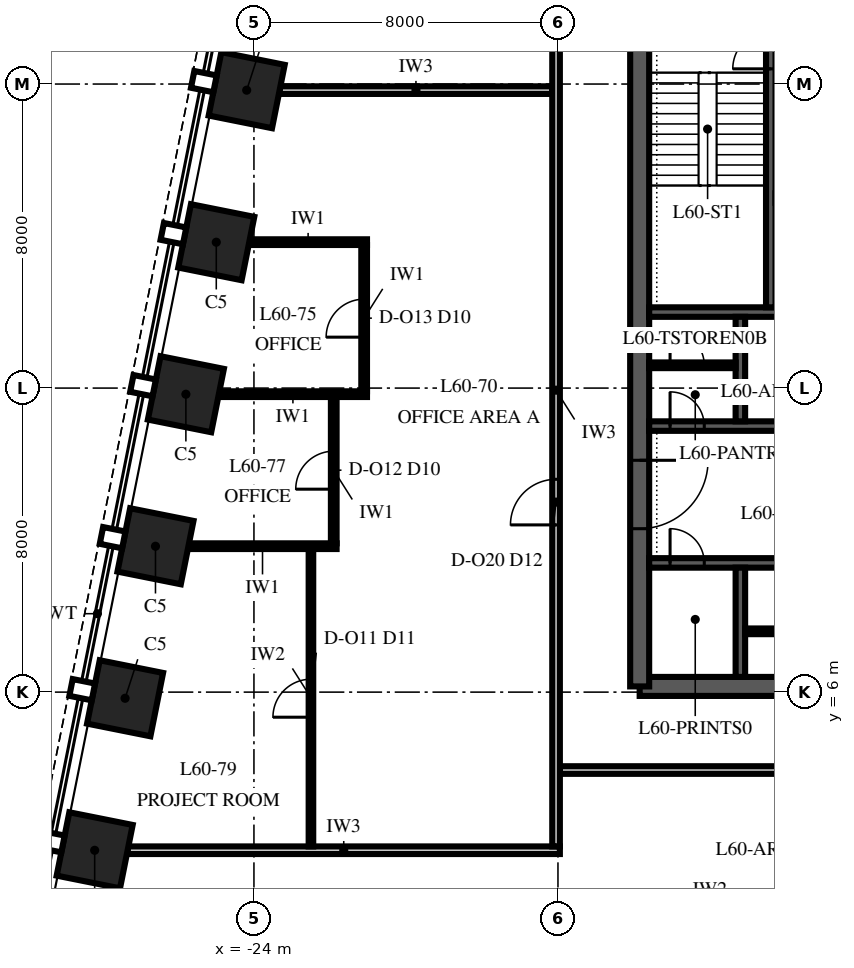
"""IFC4 building model, lengths in metres.
Left out: names, types, materials, properties, quantities, classifications, styles, units other than length and angle.
Written with IfcOpenShell. Run it as: python <this file> out.ifc"""

import sys

from ifc_helpers import new_model, si_unit, direction, frame, frame_2d, origin, origin_2d, place, context, subcontext, project, spatial, polyline, rectangle, outline, extrude, element, fill, save


model = new_model("IFC4")
c1 = context("Model", 3, precision=1e-05, world=origin(), true_north=direction((0.0, 1.0)))
c2 = subcontext(c1, "Body", "Model", "MODEL_VIEW")
j1 = project(units=[si_unit("LENGTHUNIT", "METRE"), si_unit("PLANEANGLEUNIT", "RADIAN")], contexts=[c1])
p1 = place(None, origin())
s1 = spatial("IfcSite", under=j1, at=p1, CompositionType="ELEMENT")
p2 = place(p1, origin())
s2 = spatial("IfcBuilding", under=s1, at=p2, CompositionType="ELEMENT")
p3 = place(p2, frame((0.0, 0.0, 260.0)))
s3 = spatial("IfcBuildingStorey", under=s2, at=p3, CompositionType="ELEMENT", Elevation=260.0)
for number, where, z_axis, x_axis in (
    (1, (-24.191, 21.838, 0.0), (0.0, 0.0, 1.0), (-0.196, -0.981, 0.0)),
    (2, (-24.991, 17.838, 0.0), (0.0, 0.0, 1.0), (-0.196, -0.981, 0.0)),
    (3, (-25.791, 13.838, 0.0), (0.0, 0.0, 1.0), (-0.196, -0.981, 0.0)),
    (4, (-26.591, 9.838, 0.0), (0.0, 0.0, 1.0), (-0.196, -0.981, 0.0)),
    (5, (-27.391, 5.838, 0.0), (0.0, 0.0, 1.0), (-0.196, -0.981, 0.0)),
    (6, (-28.191, 1.838, 0.0), (0.0, 0.0, 1.0), (-0.196, -0.981, 0.0)),
):
    element("IfcColumn", number, at=place(p3, frame(where, z_axis=z_axis, x_axis=x_axis)), inside=s3, PredefinedType="COLUMN", context=c2, shape_type="SweptSolid", body=[
        extrude(rectangle(XDim=1.7, YDim=1.7, at=origin_2d()), origin(), (0.0, 0.0, 1.0), 4.0),
    ])
p4 = place(p3, frame((-13.85, 6.15, 0.0), z_axis=(0.0, 0.0, 1.0), x_axis=(1.0, 0.0, 0.0)))
e7 = element("IfcWall", 7, at=p4, inside=s3, PredefinedType="SHEAR", context=c2, shape_type="SweptSolid", body=[
    extrude(rectangle(XDim=27.7, YDim=0.5, at=frame_2d((13.85, 0.0))), origin(), (0.0, 0.0, 1.0), 4.0),
])
p5 = place(p3, frame((-13.85, 23.85, 0.0), z_axis=(0.0, 0.0, 1.0), x_axis=(0.0, -1.0, 0.0)))
e8 = element("IfcWall", 8, at=p5, inside=s3, PredefinedType="SHEAR", context=c2, shape_type="SweptSolid", body=[
    extrude(outline(polyline([(0.0, -0.25), (17.7, -0.25), (17.7, 0.0), (17.45, 0.0), (17.45, 0.25), (0.25, 0.25), (0.25, 0.0), (0.0, 0.0), (0.0, -0.25)])), origin(), (0.0, 0.0, 1.0), 4.0),
])
p6 = place(p5, frame((11.75, 0.0, 0.0)))
e9 = element("IfcOpeningElement", 9, at=p6, cuts=e8, PredefinedType="OPENING", context=c2, shape_type="SweptSolid", body=[
    extrude(rectangle(XDim=1.8, YDim=2.4, at=frame_2d((0.9, 1.2))), frame((0.0, 0.265, 0.0), z_axis=(0.0, -1.0, 0.0), x_axis=(1.0, 0.0, 0.0)), (0.0, 0.0, 1.0), 0.53),
])
p7 = place(p3, frame((-13.6, 9.4, 0.0), z_axis=(0.0, 0.0, 1.0), x_axis=(1.0, 0.0, 0.0)))
e10 = element("IfcWall", 10, at=p7, inside=s3, PredefinedType="SHEAR", context=c2, shape_type="SweptSolid", body=[
    extrude(rectangle(XDim=27.2, YDim=0.25, at=frame_2d((13.6, 0.0))), origin(), (0.0, 0.0, 1.0), 4.0),
])
p8 = place(p7, frame((8.85, 0.0, 0.0)))
e11 = element("IfcOpeningElement", 11, at=p8, cuts=e10, PredefinedType="OPENING", context=c2, shape_type="SweptSolid", body=[
    extrude(rectangle(XDim=1.1, YDim=2.1, at=frame_2d((0.55, 1.05))), frame((0.0, 0.14, 0.0), z_axis=(0.0, -1.0, 0.0), x_axis=(1.0, 0.0, 0.0)), (0.0, 0.0, 1.0), 0.28),
])
p9 = place(p7, frame((11.65, 0.0, 0.0)))
e12 = element("IfcOpeningElement", 12, at=p9, cuts=e10, PredefinedType="OPENING", context=c2, shape_type="SweptSolid", body=[
    extrude(rectangle(XDim=1.1, YDim=2.1, at=frame_2d((0.55, 1.05))), frame((0.0, 0.14, 0.0), z_axis=(0.0, -1.0, 0.0), x_axis=(1.0, 0.0, 0.0)), (0.0, 0.0, 1.0), 0.28),
])
p10 = place(p7, frame((14.45, 0.0, 0.0)))
e13 = element("IfcOpeningElement", 13, at=p10, cuts=e10, PredefinedType="OPENING", context=c2, shape_type="SweptSolid", body=[
    extrude(rectangle(XDim=1.1, YDim=2.1, at=frame_2d((0.55, 1.05))), frame((0.0, 0.14, 0.0), z_axis=(0.0, -1.0, 0.0), x_axis=(1.0, 0.0, 0.0)), (0.0, 0.0, 1.0), 0.28),
])
p11 = place(p7, frame((0.55, 0.0, 0.0)))
e14 = element("IfcOpeningElement", 14, at=p11, cuts=e10, PredefinedType="OPENING", context=c2, shape_type="SweptSolid", body=[
    extrude(rectangle(XDim=0.9, YDim=2.1, at=frame_2d((0.45, 1.05))), frame((0.0, 0.14, 0.0), z_axis=(0.0, -1.0, 0.0), x_axis=(1.0, 0.0, 0.0)), (0.0, 0.0, 1.0), 0.28),
])
p12 = place(p7, frame((3.35, 0.0, 0.0)))
e15 = element("IfcOpeningElement", 15, at=p12, cuts=e10, PredefinedType="OPENING", context=c2, shape_type="SweptSolid", body=[
    extrude(rectangle(XDim=0.9, YDim=2.1, at=frame_2d((0.45, 1.05))), frame((0.0, 0.14, 0.0), z_axis=(0.0, -1.0, 0.0), x_axis=(1.0, 0.0, 0.0)), (0.0, 0.0, 1.0), 0.28),
])
p13 = place(p7, frame((6.15, 0.0, 0.0)))
e16 = element("IfcOpeningElement", 16, at=p13, cuts=e10, PredefinedType="OPENING", context=c2, shape_type="SweptSolid", body=[
    extrude(rectangle(XDim=0.9, YDim=2.1, at=frame_2d((0.45, 1.05))), frame((0.0, 0.14, 0.0), z_axis=(0.0, -1.0, 0.0), x_axis=(1.0, 0.0, 0.0)), (0.0, 0.0, 1.0), 0.28),
])
p14 = place(p7, frame((17.35, 0.0, 0.0)))
e17 = element("IfcOpeningElement", 17, at=p14, cuts=e10, PredefinedType="OPENING", context=c2, shape_type="SweptSolid", body=[
    extrude(rectangle(XDim=0.9, YDim=2.1, at=frame_2d((0.45, 1.05))), frame((0.0, 0.14, 0.0), z_axis=(0.0, -1.0, 0.0), x_axis=(1.0, 0.0, 0.0)), (0.0, 0.0, 1.0), 0.28),
])
p15 = place(p7, frame((20.15, 0.0, 0.0)))
e18 = element("IfcOpeningElement", 18, at=p15, cuts=e10, PredefinedType="OPENING", context=c2, shape_type="SweptSolid", body=[
    extrude(rectangle(XDim=0.9, YDim=2.1, at=frame_2d((0.45, 1.05))), frame((0.0, 0.14, 0.0), z_axis=(0.0, -1.0, 0.0), x_axis=(1.0, 0.0, 0.0)), (0.0, 0.0, 1.0), 0.28),
])
p16 = place(p7, frame((22.95, 0.0, 0.0)))
e19 = element("IfcOpeningElement", 19, at=p16, cuts=e10, PredefinedType="OPENING", context=c2, shape_type="SweptSolid", body=[
    extrude(rectangle(XDim=0.9, YDim=2.1, at=frame_2d((0.45, 1.05))), frame((0.0, 0.14, 0.0), z_axis=(0.0, -1.0, 0.0), x_axis=(1.0, 0.0, 0.0)), (0.0, 0.0, 1.0), 0.28),
])
p17 = place(p3, frame((-13.6, 13.0, 0.0), z_axis=(0.0, 0.0, 1.0), x_axis=(1.0, 0.0, 0.0)))
e20 = element("IfcWall", 20, at=p17, inside=s3, PredefinedType="SHEAR", context=c2, shape_type="SweptSolid", body=[
    extrude(rectangle(XDim=27.2, YDim=0.25, at=frame_2d((13.6, 0.0))), origin(), (0.0, 0.0, 1.0), 4.0),
])
p18 = place(p17, frame((15.25, 0.0, 0.0)))
e21 = element("IfcOpeningElement", 21, at=p18, cuts=e20, PredefinedType="OPENING", context=c2, shape_type="SweptSolid", body=[
    extrude(rectangle(XDim=0.9, YDim=2.1, at=frame_2d((0.45, 1.05))), frame((0.0, 0.14, 0.0), z_axis=(0.0, -1.0, 0.0), x_axis=(1.0, 0.0, 0.0)), (0.0, 0.0, 1.0), 0.28),
])
p19 = place(p17, frame((17.65, 0.0, 0.0)))
e22 = element("IfcOpeningElement", 22, at=p19, cuts=e20, PredefinedType="OPENING", context=c2, shape_type="SweptSolid", body=[
    extrude(rectangle(XDim=0.9, YDim=2.1, at=frame_2d((0.45, 1.05))), frame((0.0, 0.14, 0.0), z_axis=(0.0, -1.0, 0.0), x_axis=(1.0, 0.0, 0.0)), (0.0, 0.0, 1.0), 0.28),
])
p20 = place(p17, frame((21.15, 0.0, 0.0)))
e23 = element("IfcOpeningElement", 23, at=p20, cuts=e20, PredefinedType="OPENING", context=c2, shape_type="SweptSolid", body=[
    extrude(rectangle(XDim=0.9, YDim=2.1, at=frame_2d((0.45, 1.05))), frame((0.0, 0.14, 0.0), z_axis=(0.0, -1.0, 0.0), x_axis=(1.0, 0.0, 0.0)), (0.0, 0.0, 1.0), 0.28),
])
p21 = place(p17, frame((0.55, 0.0, 0.0)))
e24 = element("IfcOpeningElement", 24, at=p21, cuts=e20, PredefinedType="OPENING", context=c2, shape_type="SweptSolid", body=[
    extrude(rectangle(XDim=0.9, YDim=2.1, at=frame_2d((0.45, 1.05))), frame((0.0, 0.14, 0.0), z_axis=(0.0, -1.0, 0.0), x_axis=(1.0, 0.0, 0.0)), (0.0, 0.0, 1.0), 0.28),
])
p22 = place(p17, frame((3.35, 0.0, 0.0)))
e25 = element("IfcOpeningElement", 25, at=p22, cuts=e20, PredefinedType="OPENING", context=c2, shape_type="SweptSolid", body=[
    extrude(rectangle(XDim=0.9, YDim=2.1, at=frame_2d((0.45, 1.05))), frame((0.0, 0.14, 0.0), z_axis=(0.0, -1.0, 0.0), x_axis=(1.0, 0.0, 0.0)), (0.0, 0.0, 1.0), 0.28),
])
p23 = place(p17, frame((6.15, 0.0, 0.0)))
e26 = element("IfcOpeningElement", 26, at=p23, cuts=e20, PredefinedType="OPENING", context=c2, shape_type="SweptSolid", body=[
    extrude(rectangle(XDim=0.9, YDim=2.1, at=frame_2d((0.45, 1.05))), frame((0.0, 0.14, 0.0), z_axis=(0.0, -1.0, 0.0), x_axis=(1.0, 0.0, 0.0)), (0.0, 0.0, 1.0), 0.28),
])
p24 = place(p3, frame((-13.6, 16.0, 0.0), z_axis=(0.0, 0.0, 1.0), x_axis=(1.0, 0.0, 0.0)))
e27 = element("IfcWall", 27, at=p24, inside=s3, PredefinedType="SHEAR", context=c2, shape_type="SweptSolid", body=[
    extrude(rectangle(XDim=27.2, YDim=0.25, at=frame_2d((13.6, 0.0))), origin(), (0.0, 0.0, 1.0), 4.0),
])
p25 = place(p3, frame((-11.2, 6.4, 0.0), z_axis=(0.0, 0.0, 1.0), x_axis=(0.0, 1.0, 0.0)))
e28 = element("IfcWall", 28, at=p25, inside=s3, PredefinedType="SHEAR", context=c2, shape_type="SweptSolid", body=[
    extrude(rectangle(XDim=2.875, YDim=0.25, at=frame_2d((1.438, 0.0))), origin(), (0.0, 0.0, 1.0), 4.0),
])
p26 = place(p3, frame((-11.2, 13.125, 0.0), z_axis=(0.0, 0.0, 1.0), x_axis=(0.0, 1.0, 0.0)))
e29 = element("IfcWall", 29, at=p26, inside=s3, PredefinedType="SHEAR", context=c2, shape_type="SweptSolid", body=[
    extrude(rectangle(XDim=2.75, YDim=0.25, at=frame_2d((1.375, 0.0))), origin(), (0.0, 0.0, 1.0), 4.0),
])
p27 = place(p3, frame((-10.4, 16.125, 0.0), z_axis=(0.0, 0.0, 1.0), x_axis=(0.0, 1.0, 0.0)))
e30 = element("IfcWall", 30, at=p27, inside=s3, PredefinedType="SHEAR", context=c2, shape_type="SweptSolid", body=[
    extrude(rectangle(XDim=7.475, YDim=0.25, at=frame_2d((3.738, 0.0))), origin(), (0.0, 0.0, 1.0), 4.0),
])
p28 = place(p27, frame((6.275, 0.0, 0.0)))
e31 = element("IfcOpeningElement", 31, at=p28, cuts=e30, PredefinedType="OPENING", context=c2, shape_type="SweptSolid", body=[
    extrude(rectangle(XDim=1.0, YDim=2.1, at=frame_2d((0.5, 1.05))), frame((0.0, 0.14, 0.0), z_axis=(0.0, -1.0, 0.0), x_axis=(1.0, 0.0, 0.0)), (0.0, 0.0, 1.0), 0.28),
])
p29 = place(p3, frame((-13.6, 14.6, 0.0), z_axis=(0.0, 0.0, 1.0), x_axis=(1.0, 0.0, 0.0)))
e32 = element("IfcWall", 32, at=p29, inside=s3, PredefinedType="PARTITIONING", context=c2, shape_type="SweptSolid", body=[
    extrude(rectangle(XDim=2.275, YDim=0.15, at=frame_2d((1.138, 0.0))), origin(), (0.0, 0.0, 1.0), 3.85),
])
p30 = place(p29, frame((0.55, 0.0, 0.0)))
e33 = element("IfcOpeningElement", 33, at=p30, cuts=e32, PredefinedType="OPENING", context=c2, shape_type="SweptSolid", body=[
    extrude(rectangle(XDim=0.9, YDim=2.1, at=frame_2d((0.45, 1.05))), frame((0.0, 0.09, 0.0), z_axis=(0.0, -1.0, 0.0), x_axis=(1.0, 0.0, 0.0)), (0.0, 0.0, 1.0), 0.18),
])
p31 = place(p3, frame((-11.075, 7.6, 0.0), z_axis=(0.0, 0.0, 1.0), x_axis=(1.0, 0.0, 0.0)))
e34 = element("IfcWall", 34, at=p31, inside=s3, PredefinedType="PARTITIONING", context=c2, shape_type="SweptSolid", body=[
    extrude(rectangle(XDim=2.55, YDim=0.15, at=frame_2d((1.275, 0.0))), origin(), (0.0, 0.0, 1.0), 3.85),
])
p32 = place(p31, frame((0.825, 0.0, 0.0)))
e35 = element("IfcOpeningElement", 35, at=p32, cuts=e34, PredefinedType="OPENING", context=c2, shape_type="SweptSolid", body=[
    extrude(rectangle(XDim=0.9, YDim=2.1, at=frame_2d((0.45, 1.05))), frame((0.0, 0.09, 0.0), z_axis=(0.0, -1.0, 0.0), x_axis=(1.0, 0.0, 0.0)), (0.0, 0.0, 1.0), 0.18),
])
p33 = place(p3, frame((-27.324, 1.84, 0.0), z_axis=(0.0, 0.0, 1.0), x_axis=(1.0, 0.0, 0.0)))
e36 = element("IfcWall", 36, at=p33, inside=s3, PredefinedType="PARTITIONING", context=c2, shape_type="SweptSolid", body=[
    extrude(rectangle(XDim=11.374, YDim=0.2, at=frame_2d((5.687, 0.0))), origin(), (0.0, 0.0, 1.0), 3.23),
])
p34 = place(p3, frame((-15.95, 3.95, 0.0), z_axis=(0.0, 0.0, 1.0), x_axis=(1.0, 0.0, 0.0)))
e37 = element("IfcWall", 37, at=p34, inside=s3, PredefinedType="PARTITIONING", context=c2, shape_type="SweptSolid", body=[
    extrude(rectangle(XDim=14.05, YDim=0.2, at=frame_2d((7.025, 0.0))), origin(), (0.0, 0.0, 1.0), 3.23),
])
p35 = place(p34, frame((7.35, 0.0, 0.0)))
e38 = element("IfcOpeningElement", 38, at=p35, cuts=e37, PredefinedType="OPENING", context=c2, shape_type="SweptSolid", body=[
    extrude(rectangle(XDim=1.2, YDim=2.4, at=frame_2d((0.6, 1.2))), frame((0.0, 0.115, 0.0), z_axis=(0.0, -1.0, 0.0), x_axis=(1.0, 0.0, 0.0)), (0.0, 0.0, 1.0), 0.23),
])
for number, where, z_axis, x_axis in (
    (39, (-25.724, 9.84, 0.0), (0.0, 0.0, 1.0), (1.0, 0.0, 0.0)),
    (40, (-24.924, 13.84, 0.0), (0.0, 0.0, 1.0), (1.0, 0.0, 0.0)),
):
    element("IfcWall", number, at=place(p3, frame(where, z_axis=z_axis, x_axis=x_axis)), inside=s3, PredefinedType="PARTITIONING", context=c2, shape_type="SweptSolid", body=[
        extrude(rectangle(XDim=3.899, YDim=0.15, at=frame_2d((1.949, 0.0))), origin(), (0.0, 0.0, 1.0), 3.23),
    ])
p36 = place(p3, frame((-24.124, 17.84, 0.0), z_axis=(0.0, 0.0, 1.0), x_axis=(1.0, 0.0, 0.0)))
e41 = element("IfcWall", 41, at=p36, inside=s3, PredefinedType="PARTITIONING", context=c2, shape_type="SweptSolid", body=[
    extrude(rectangle(XDim=3.099, YDim=0.15, at=frame_2d((1.549, 0.0))), origin(), (0.0, 0.0, 1.0), 3.23),
])
p37 = place(p3, frame((-23.324, 21.84, 0.0), z_axis=(0.0, 0.0, 1.0), x_axis=(1.0, 0.0, 0.0)))
e42 = element("IfcWall", 42, at=p37, inside=s3, PredefinedType="PARTITIONING", context=c2, shape_type="SweptSolid", body=[
    extrude(rectangle(XDim=7.174, YDim=0.2, at=frame_2d((3.587, 0.0))), origin(), (0.0, 0.0, 1.0), 3.23),
])
p38 = place(p3, frame((-22.5, 1.94, 0.0), z_axis=(0.0, 0.0, 1.0), x_axis=(0.0, 1.0, 0.0)))
e43 = element("IfcWall", 43, at=p38, inside=s3, PredefinedType="PARTITIONING", context=c2, shape_type="SweptSolid", body=[
    extrude(rectangle(XDim=7.825, YDim=0.12, at=frame_2d((3.913, 0.0))), origin(), (0.0, 0.0, 1.0), 2.842),
])
p39 = place(p38, frame((3.4, 0.0, 0.0)))
e44 = element("IfcOpeningElement", 44, at=p39, cuts=e43, PredefinedType="OPENING", context=c2, shape_type="SweptSolid", body=[
    extrude(rectangle(XDim=1.0, YDim=2.4, at=frame_2d((0.5, 1.2))), frame((0.0, 0.075, 0.0), z_axis=(0.0, -1.0, 0.0), x_axis=(1.0, 0.0, 0.0)), (0.0, 0.0, 1.0), 0.15),
])
p40 = place(p3, frame((-21.9, 9.915, 0.0), z_axis=(0.0, 0.0, 1.0), x_axis=(0.0, 1.0, 0.0)))
e45 = element("IfcWall", 45, at=p40, inside=s3, PredefinedType="PARTITIONING", context=c2, shape_type="SweptSolid", body=[
    extrude(rectangle(XDim=3.85, YDim=0.15, at=frame_2d((1.925, 0.0))), origin(), (0.0, 0.0, 1.0), 3.85),
])
p41 = place(p40, frame((1.425, 0.0, 0.0)))
e46 = element("IfcOpeningElement", 46, at=p41, cuts=e45, PredefinedType="OPENING", context=c2, shape_type="SweptSolid", body=[
    extrude(rectangle(XDim=1.0, YDim=2.3, at=frame_2d((0.5, 1.15))), frame((0.0, 0.09, 0.0), z_axis=(0.0, -1.0, 0.0), x_axis=(1.0, 0.0, 0.0)), (0.0, 0.0, 1.0), 0.18),
])
p42 = place(p3, frame((-21.1, 13.915, 0.0), z_axis=(0.0, 0.0, 1.0), x_axis=(0.0, 1.0, 0.0)))
e47 = element("IfcWall", 47, at=p42, inside=s3, PredefinedType="PARTITIONING", context=c2, shape_type="SweptSolid", body=[
    extrude(rectangle(XDim=3.85, YDim=0.15, at=frame_2d((1.925, 0.0))), origin(), (0.0, 0.0, 1.0), 3.23),
])
p43 = place(p42, frame((1.425, 0.0, 0.0)))
e48 = element("IfcOpeningElement", 48, at=p43, cuts=e47, PredefinedType="OPENING", context=c2, shape_type="SweptSolid", body=[
    extrude(rectangle(XDim=1.0, YDim=2.3, at=frame_2d((0.5, 1.15))), frame((0.0, 0.09, 0.0), z_axis=(0.0, -1.0, 0.0), x_axis=(1.0, 0.0, 0.0)), (0.0, 0.0, 1.0), 0.18),
])
p44 = place(p3, frame((-16.05, 1.94, 0.0), z_axis=(0.0, 0.0, 1.0), x_axis=(0.0, 1.0, 0.0)))
e49 = element("IfcWall", 49, at=p44, inside=s3, PredefinedType="PARTITIONING", context=c2, shape_type="SweptSolid", body=[
    extrude(rectangle(XDim=24.01, YDim=0.2, at=frame_2d((12.005, 0.0))), origin(), (0.0, 0.0, 1.0), 2.842),
])
p45 = place(p44, frame((8.46, 0.0, 0.0)))
e50 = element("IfcOpeningElement", 50, at=p45, cuts=e49, PredefinedType="OPENING", context=c2, shape_type="SweptSolid", body=[
    extrude(rectangle(XDim=1.2, YDim=2.4, at=frame_2d((0.6, 1.2))), frame((0.0, 0.115, 0.0), z_axis=(0.0, -1.0, 0.0), x_axis=(1.0, 0.0, 0.0)), (0.0, 0.0, 1.0), 0.23),
])
p46 = place(p44, frame((22.46, 0.0, 0.0)))
e51 = element("IfcOpeningElement", 51, at=p46, cuts=e49, PredefinedType="OPENING", context=c2, shape_type="SweptSolid", body=[
    extrude(rectangle(XDim=1.2, YDim=2.4, at=frame_2d((0.6, 1.2))), frame((0.0, 0.115, 0.0), z_axis=(0.0, -1.0, 0.0), x_axis=(1.0, 0.0, 0.0)), (0.0, 0.0, 1.0), 0.23),
])
p47 = place(p6, origin())
e52 = element("IfcDoor", 52, at=p47, inside=s3, OperationType="DOUBLE_DOOR_SINGLE_SWING", PredefinedType="DOOR", context=c2, shape_type="SweptSolid", body=[
    extrude(rectangle(XDim=1.8, YDim=2.4, at=frame_2d((0.9, 1.2))), frame((0.0, 0.25, 0.0), z_axis=(0.0, -1.0, 0.0), x_axis=(1.0, 0.0, 0.0)), (0.0, 0.0, 1.0), 0.5),
])
fill(e9, e52)
p48 = place(p28, origin())
e53 = element("IfcDoor", 53, at=p48, inside=s3, OperationType="SINGLE_SWING_LEFT", PredefinedType="DOOR", context=c2, shape_type="SweptSolid", body=[
    extrude(rectangle(XDim=1.0, YDim=2.1, at=frame_2d((0.5, 1.05))), frame((0.0, 0.125, 0.0), z_axis=(0.0, -1.0, 0.0), x_axis=(1.0, 0.0, 0.0)), (0.0, 0.0, 1.0), 0.25),
])
fill(e31, e53)
p49 = place(p21, origin())
e54 = element("IfcDoor", 54, at=p49, inside=s3, OperationType="SINGLE_SWING_LEFT", PredefinedType="DOOR", context=c2, shape_type="SweptSolid", body=[
    extrude(rectangle(XDim=0.9, YDim=2.1, at=frame_2d((0.45, 1.05))), frame((0.0, 0.125, 0.0), z_axis=(0.0, -1.0, 0.0), x_axis=(1.0, 0.0, 0.0)), (0.0, 0.0, 1.0), 0.25),
])
fill(e24, e54)
p50 = place(p30, origin())
e55 = element("IfcDoor", 55, at=p50, inside=s3, OperationType="SINGLE_SWING_LEFT", PredefinedType="DOOR", context=c2, shape_type="SweptSolid", body=[
    extrude(rectangle(XDim=0.9, YDim=2.1, at=frame_2d((0.45, 1.05))), frame((0.0, 0.075, 0.0), z_axis=(0.0, -1.0, 0.0), x_axis=(1.0, 0.0, 0.0)), (0.0, 0.0, 1.0), 0.149),
])
fill(e33, e55)
p51 = place(p11, origin())
e56 = element("IfcDoor", 56, at=p51, inside=s3, OperationType="SINGLE_SWING_LEFT", PredefinedType="DOOR", context=c2, shape_type="SweptSolid", body=[
    extrude(rectangle(XDim=0.9, YDim=2.1, at=frame_2d((0.45, 1.05))), frame((0.0, 0.125, 0.0), z_axis=(0.0, -1.0, 0.0), x_axis=(1.0, 0.0, 0.0)), (0.0, 0.0, 1.0), 0.25),
])
fill(e14, e56)
p52 = place(p39, origin())
e57 = element("IfcDoor", 57, at=p52, inside=s3, OperationType="SINGLE_SWING_RIGHT", PredefinedType="DOOR", context=c2, shape_type="SweptSolid", body=[
    extrude(rectangle(XDim=1.0, YDim=2.4, at=frame_2d((0.5, 1.2))), frame((0.0, 0.06, 0.0), z_axis=(0.0, -1.0, 0.0), x_axis=(1.0, 0.0, 0.0)), (0.0, 0.0, 1.0), 0.12),
])
fill(e44, e57)
p53 = place(p41, origin())
e58 = element("IfcDoor", 58, at=p53, inside=s3, OperationType="SINGLE_SWING_LEFT", PredefinedType="DOOR", context=c2, shape_type="SweptSolid", body=[
    extrude(rectangle(XDim=1.0, YDim=2.3, at=frame_2d((0.5, 1.15))), frame((0.0, 0.075, 0.0), z_axis=(0.0, -1.0, 0.0), x_axis=(1.0, 0.0, 0.0)), (0.0, 0.0, 1.0), 0.149),
])
fill(e46, e58)
p54 = place(p43, origin())
e59 = element("IfcDoor", 59, at=p54, inside=s3, OperationType="SINGLE_SWING_LEFT", PredefinedType="DOOR", context=c2, shape_type="SweptSolid", body=[
    extrude(rectangle(XDim=1.0, YDim=2.3, at=frame_2d((0.5, 1.15))), frame((0.0, 0.075, 0.0), z_axis=(0.0, -1.0, 0.0), x_axis=(1.0, 0.0, 0.0)), (0.0, 0.0, 1.0), 0.149),
])
fill(e48, e59)
p55 = place(p45, origin())
e60 = element("IfcDoor", 60, at=p55, inside=s3, OperationType="SINGLE_SWING_LEFT", PredefinedType="DOOR", context=c2, shape_type="SweptSolid", body=[
    extrude(rectangle(XDim=1.2, YDim=2.4, at=frame_2d((0.6, 1.2))), frame((0.0, 0.1, 0.0), z_axis=(0.0, -1.0, 0.0), x_axis=(1.0, 0.0, 0.0)), (0.0, 0.0, 1.0), 0.199),
])
fill(e50, e60)
save(model, sys.argv[1])
